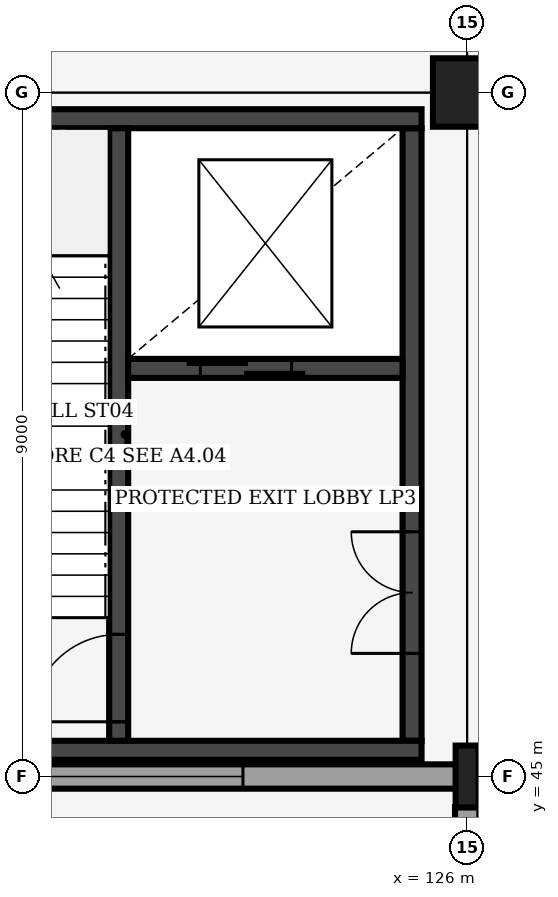
"""IFC4 building model, lengths in metres.
Left out: names, types, materials, properties, quantities, classifications, styles, units other than length and angle.
Written with IfcOpenShell. Run it as: python <this file> out.ifc"""

import sys

from ifc_helpers import new_model, si_unit, direction, frame, frame_2d, origin, origin_2d, place, context, subcontext, project, spatial, rectangle, i_section, extrude, element, fill, save


model = new_model("IFC4")
c1 = context("Model", 3, precision=1e-05, world=origin(), true_north=direction((0.0, 1.0)))
c2 = subcontext(c1, "Body", "Model", "MODEL_VIEW")
j1 = project(units=[si_unit("LENGTHUNIT", "METRE"), si_unit("PLANEANGLEUNIT", "RADIAN")], contexts=[c1])
p1 = place(None, origin())
s1 = spatial("IfcSite", under=j1, at=p1, CompositionType="ELEMENT")
p2 = place(p1, origin())
s2 = spatial("IfcBuilding", under=s1, at=p2, CompositionType="ELEMENT")
p3 = place(p2, origin())
s3 = spatial("IfcBuildingStorey", under=s2, at=p3, CompositionType="ELEMENT", Elevation=0.0)
p4 = place(p3, frame((126.0, 45.0, 0.0), z_axis=(0.0, 0.0, 1.0), x_axis=(1.0, 0.0, 0.0)))
e1 = element("IfcColumn", 1, at=p4, inside=s3, PredefinedType="COLUMN", context=c2, shape_type="SweptSolid", body=[
    extrude(i_section(OverallWidth=0.303, OverallDepth=0.814, WebThickness=0.021, FlangeThickness=0.04, FilletRadius=0.03, at=origin_2d()), origin(), (0.0, 0.0, 1.0), 6.0),
])
p5 = place(p3, frame((126.0, 54.0, 0.0), z_axis=(0.0, 0.0, 1.0), x_axis=(1.0, 0.0, 0.0)))
e2 = element("IfcColumn", 2, at=p5, inside=s3, PredefinedType="COLUMN", context=c2, shape_type="SweptSolid", body=[
    extrude(rectangle(XDim=0.9, YDim=0.9, at=origin_2d()), origin(), (0.0, 0.0, 1.0), 6.0),
])
p6 = place(p3, frame((126.0, 36.445, 0.0), z_axis=(0.0, 0.0, 1.0), x_axis=(0.0, 1.0, 0.0)))
e3 = element("IfcWall", 3, at=p6, inside=s3, PredefinedType="SOLIDWALL", context=c2, shape_type="SweptSolid", body=[
    extrude(rectangle(XDim=8.153, YDim=0.32, at=frame_2d((4.076, 0.0))), origin(), (0.0, 0.0, 1.0), 4.95),
])
p7 = place(p6, frame((2.555, 0.0, 0.85)))
e4 = element("IfcOpeningElement", 4, at=p7, cuts=e3, PredefinedType="OPENING", context=c2, shape_type="SweptSolid", body=[
    extrude(rectangle(XDim=2.5, YDim=1.8, at=frame_2d((1.25, 0.9))), frame((0.0, 0.17, 0.0), z_axis=(0.0, -1.0, 0.0), x_axis=(1.0, 0.0, 0.0)), (0.0, 0.0, 1.0), 0.34),
])
p8 = place(p3, frame((117.445, 45.0, 0.0), z_axis=(0.0, 0.0, 1.0), x_axis=(1.0, 0.0, 0.0)))
e5 = element("IfcWall", 5, at=p8, inside=s3, PredefinedType="SOLIDWALL", context=c2, shape_type="SweptSolid", body=[
    extrude(rectangle(XDim=8.408, YDim=0.32, at=frame_2d((4.204, 0.0))), origin(), (0.0, 0.0, 1.0), 4.95),
])
p9 = place(p8, frame((2.505, 0.0, 3.3)))
e6 = element("IfcOpeningElement", 6, at=p9, cuts=e5, PredefinedType="OPENING", context=c2, shape_type="SweptSolid", body=[
    extrude(rectangle(XDim=3.1, YDim=1.3, at=frame_2d((1.55, 0.65))), frame((0.0, 0.17, 0.0), z_axis=(0.0, -1.0, 0.0), x_axis=(1.0, 0.0, 0.0)), (0.0, 0.0, 1.0), 0.34),
])
p10 = place(p3, frame((125.275, 45.47, 0.0), z_axis=(0.0, 0.0, 1.0), x_axis=(0.0, 1.0, 0.0)))
e7 = element("IfcWall", 7, at=p10, inside=s3, PredefinedType="SHEAR", context=c2, shape_type="SweptSolid", body=[
    extrude(rectangle(XDim=8.06, YDim=0.25, at=frame_2d((4.03, 0.0))), origin(), (0.0, 0.0, 1.0), 5.71),
])
p11 = place(p10, frame((1.15, 0.0, 0.0)))
e8 = element("IfcOpeningElement", 8, at=p11, cuts=e7, PredefinedType="OPENING", context=c2, shape_type="SweptSolid", body=[
    extrude(rectangle(XDim=1.6, YDim=2.2, at=frame_2d((0.8, 1.1))), frame((0.0, 0.135, 0.0), z_axis=(0.0, -1.0, 0.0), x_axis=(1.0, 0.0, 0.0)), (0.0, 0.0, 1.0), 0.27),
])
for number, where, z_axis, x_axis in (
    (9, (117.6, 45.345, 0.0), (0.0, 0.0, 1.0), (1.0, 0.0, 0.0)),
    (10, (117.6, 53.655, 0.0), (0.0, 0.0, 1.0), (1.0, 0.0, 0.0)),
):
    element("IfcWall", number, at=place(p3, frame(where, z_axis=z_axis, x_axis=x_axis)), inside=s3, PredefinedType="SHEAR", context=c2, shape_type="SweptSolid", body=[
        extrude(rectangle(XDim=7.8, YDim=0.25, at=frame_2d((3.9, 0.0))), origin(), (0.0, 0.0, 1.0), 5.71),
    ])
p12 = place(p3, frame((121.415, 45.47, 0.0), z_axis=(0.0, 0.0, 1.0), x_axis=(0.0, 1.0, 0.0)))
e11 = element("IfcWall", 11, at=p12, inside=s3, PredefinedType="SHEAR", context=c2, shape_type="SweptSolid", body=[
    extrude(rectangle(XDim=8.06, YDim=0.25, at=frame_2d((4.03, 0.0))), origin(), (0.0, 0.0, 1.0), 5.71),
])
p13 = place(p12, frame((0.25, 0.0, 0.0)))
e12 = element("IfcOpeningElement", 12, at=p13, cuts=e11, PredefinedType="OPENING", context=c2, shape_type="SweptSolid", body=[
    extrude(rectangle(XDim=1.15, YDim=2.15, at=frame_2d((0.575, 1.075))), frame((0.0, 0.135, 0.0), z_axis=(0.0, -1.0, 0.0), x_axis=(1.0, 0.0, 0.0)), (0.0, 0.0, 1.0), 0.27),
])
p14 = place(p3, frame((121.54, 50.37, 0.0), z_axis=(0.0, 0.0, 1.0), x_axis=(1.0, 0.0, 0.0)))
e13 = element("IfcWall", 13, at=p14, inside=s3, PredefinedType="SHEAR", context=c2, shape_type="SweptSolid", body=[
    extrude(rectangle(XDim=3.61, YDim=0.25, at=frame_2d((1.805, 0.0))), origin(), (0.0, 0.0, 1.0), 5.71),
])
p15 = place(p14, frame((0.95, 0.0, 0.0)))
e14 = element("IfcOpeningElement", 14, at=p15, cuts=e13, PredefinedType="OPENING", context=c2, shape_type="SweptSolid", body=[
    extrude(rectangle(XDim=1.2, YDim=2.2, at=frame_2d((0.6, 1.1))), frame((0.0, 0.135, 0.0), z_axis=(0.0, -1.0, 0.0), x_axis=(1.0, 0.0, 0.0)), (0.0, 0.0, 1.0), 0.27),
])
p16 = place(p9, origin())
e15 = element("IfcWindow", 15, at=p16, inside=s3, PartitioningType="SINGLE_PANEL", PredefinedType="WINDOW", context=c2, shape_type="SweptSolid", body=[
    extrude(rectangle(XDim=3.1, YDim=1.3, at=frame_2d((1.55, 0.65))), frame((0.0, 0.03, 0.0), z_axis=(0.0, -1.0, 0.0), x_axis=(1.0, 0.0, 0.0)), (0.0, 0.0, 1.0), 0.06),
])
fill(e6, e15)
p17 = place(p13, origin())
e16 = element("IfcDoor", 16, at=p17, inside=s3, OperationType="SINGLE_SWING_LEFT", PredefinedType="DOOR", context=c2, shape_type="SweptSolid", body=[
    extrude(rectangle(XDim=1.15, YDim=2.15, at=frame_2d((0.575, 1.075))), frame((0.0, 0.025, 0.0), z_axis=(0.0, -1.0, 0.0), x_axis=(1.0, 0.0, 0.0)), (0.0, 0.0, 1.0), 0.05),
])
fill(e12, e16)
p18 = place(p15, origin())
e17 = element("IfcDoor", 17, at=p18, inside=s3, OperationType="DOUBLE_DOOR_SLIDING", PredefinedType="DOOR", context=c2, shape_type="SweptSolid", body=[
    extrude(rectangle(XDim=1.2, YDim=2.2, at=frame_2d((0.6, 1.1))), frame((0.0, 0.025, 0.0), z_axis=(0.0, -1.0, 0.0), x_axis=(1.0, 0.0, 0.0)), (0.0, 0.0, 1.0), 0.05),
])
fill(e14, e17)
p19 = place(p11, origin())
e18 = element("IfcDoor", 18, at=p19, inside=s3, OperationType="DOUBLE_DOOR_SINGLE_SWING", PredefinedType="DOOR", context=c2, shape_type="SweptSolid", body=[
    extrude(rectangle(XDim=1.6, YDim=2.2, at=frame_2d((0.8, 1.1))), frame((0.0, 0.025, 0.0), z_axis=(0.0, -1.0, 0.0), x_axis=(1.0, 0.0, 0.0)), (0.0, 0.0, 1.0), 0.05),
])
fill(e8, e18)
save(model, sys.argv[1])
